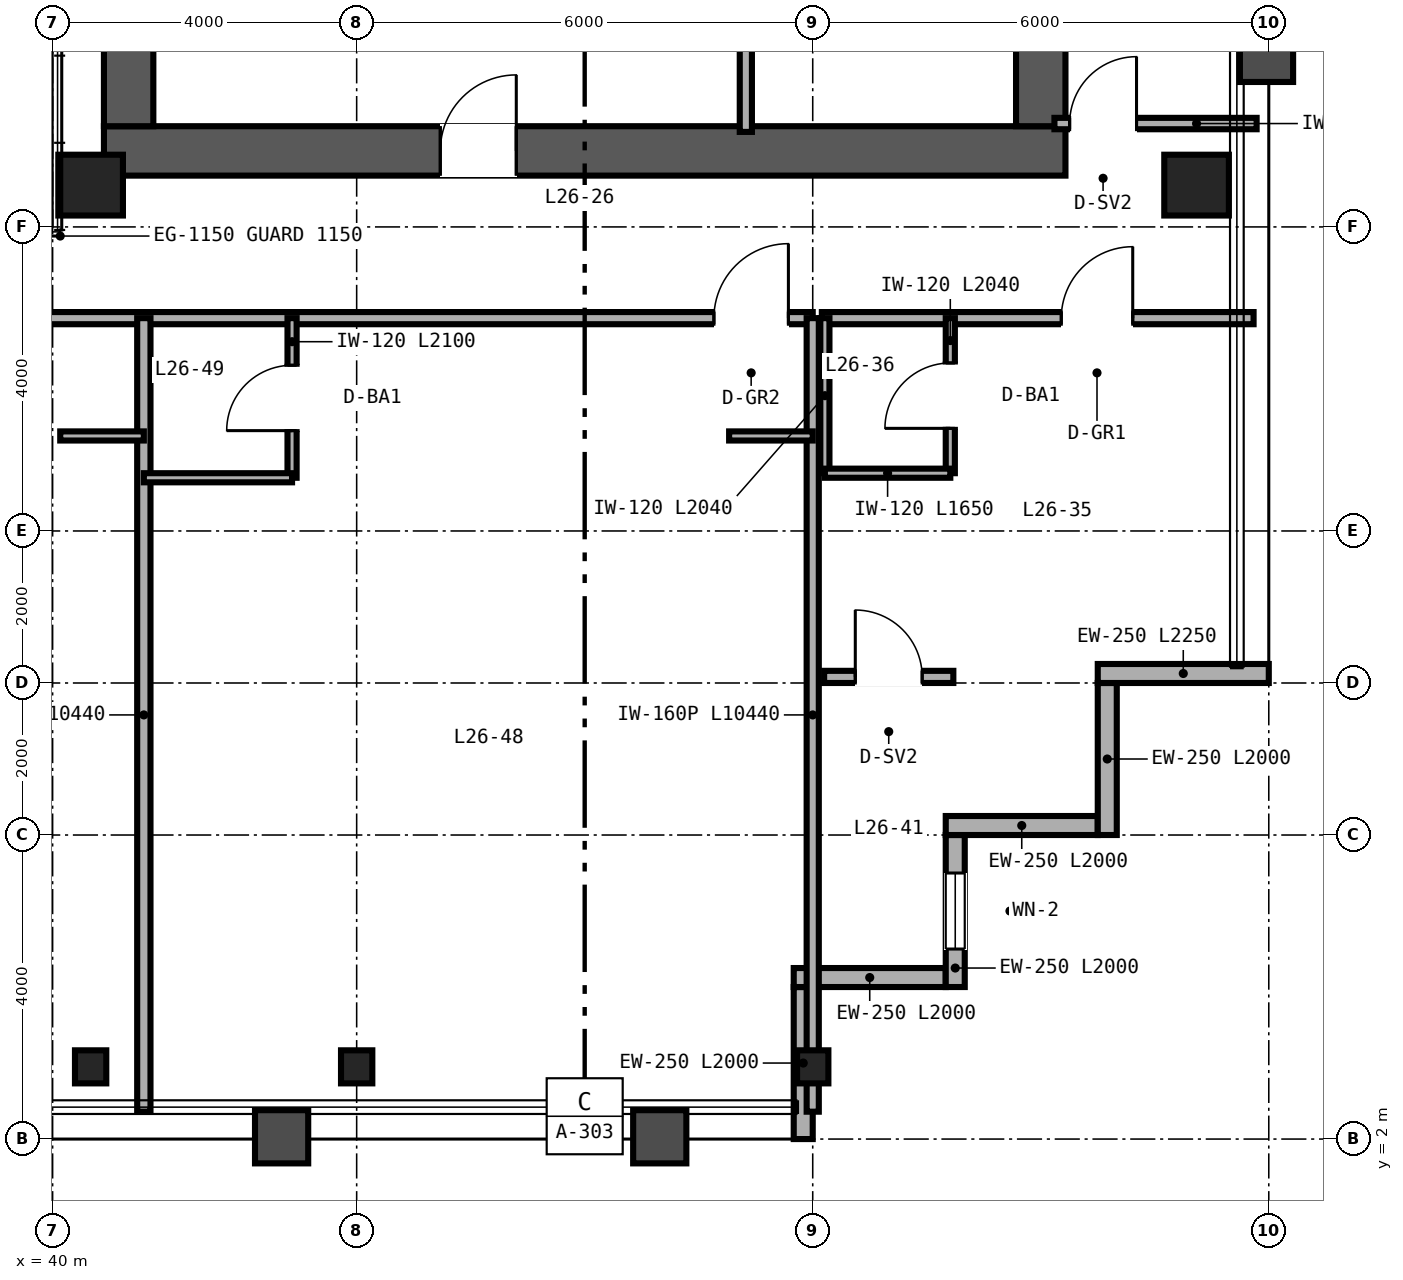
"""IFC4 building model, lengths in metres.
Left out: names, types, materials, properties, quantities, classifications, styles, units other than length and angle.
Written with IfcOpenShell. Run it as: python <this file> out.ifc"""

import sys

from ifc_helpers import new_model, si_unit, direction, frame, frame_2d, origin, origin_2d, place, context, subcontext, project, spatial, rectangle, hollow_rectangle, i_section, extrude, source, transform, mapped, element, fill, save


model = new_model("IFC4")
c1 = context("Model", 3, precision=1e-05, world=origin(), true_north=direction((0.0, 1.0)))
c2 = subcontext(c1, "Body", "Model", "MODEL_VIEW")
j1 = project(units=[si_unit("LENGTHUNIT", "METRE"), si_unit("PLANEANGLEUNIT", "RADIAN")], contexts=[c1])
p1 = place(None, origin())
s1 = spatial("IfcSite", under=j1, at=p1, CompositionType="ELEMENT")
p2 = place(p1, origin())
s2 = spatial("IfcBuilding", under=s1, at=p2, CompositionType="ELEMENT")
p3 = place(p2, frame((0.0, 0.0, 108.0)))
s3 = spatial("IfcBuildingStorey", under=s2, at=p3, CompositionType="ELEMENT", Elevation=108.0)
p4 = place(p3, frame((40.675, 15.0, 0.0), z_axis=(0.0, 0.0, 1.0), x_axis=(1.0, 0.0, 0.0)))
e1 = element("IfcWall", 1, at=p4, inside=s3, PredefinedType="SHEAR", context=c2, shape_type="SweptSolid", body=[
    extrude(rectangle(XDim=12.65, YDim=0.65, at=frame_2d((6.325, 0.0))), origin(), (0.0, 0.0, 1.0), 3.36),
])
p5 = place(p4, frame((4.425, 0.0, 0.0)))
e2 = element("IfcOpeningElement", 2, at=p5, cuts=e1, PredefinedType="OPENING", context=c2, shape_type="SweptSolid", body=[
    extrude(rectangle(XDim=1.0, YDim=2.15, at=frame_2d((0.5, 1.075))), frame((0.0, 0.335, 0.0), z_axis=(0.0, -1.0, 0.0), x_axis=(1.0, 0.0, 0.0)), (0.0, 0.0, 1.0), 0.67),
])
for number, where, z_axis, x_axis in (
    (3, (41.0, 15.325, 0.0), (0.0, 0.0, 1.0), (0.0, 1.0, 0.0)),
    (4, (53.0, 15.325, 0.0), (0.0, 0.0, 1.0), (0.0, 1.0, 0.0)),
):
    element("IfcWall", number, at=place(p3, frame(where, z_axis=z_axis, x_axis=x_axis)), inside=s3, PredefinedType="SHEAR", context=c2, shape_type="SweptSolid", body=[
        extrude(rectangle(XDim=21.35, YDim=0.65, at=frame_2d((10.675, 0.0))), origin(), (0.0, 0.0, 1.0), 3.36),
    ])
m1 = source(origin(), c2, "Body", "SweptSolid", [
    extrude(hollow_rectangle(XDim=0.85, YDim=0.8, WallThickness=0.032, at=origin_2d()), origin(), (0.0, 0.0, 1.0), 3.36),
])
for number, where, z_axis, x_axis in (
    (5, (40.5, 14.55, 0.0), (0.0, 0.0, 1.0), (1.0, 0.0, 0.0)),
    (6, (55.05, 14.55, 0.0), (0.0, 0.0, 1.0), (1.0, 0.0, 0.0)),
):
    element("IfcColumn", number, at=place(p3, frame(where, z_axis=z_axis, x_axis=x_axis)), inside=s3, PredefinedType="COLUMN", context=c2, shape_type="MappedRepresentation", body=[
        mapped(m1, transform((0.0, 0.0, 0.0), scale=1.0)),
    ])
m2 = source(origin(), c2, "Body", "SweptSolid", [
    extrude(i_section(OverallWidth=0.412, OverallDepth=0.435, WebThickness=0.036, FlangeThickness=0.057, FilletRadius=0.025, at=origin_2d()), origin(), (0.0, 0.0, 1.0), 3.36),
])
for number, where, z_axis, x_axis in (
    (7, (40.5, 2.95, 0.0), (0.0, 0.0, 1.0), (1.0, 0.0, 0.0)),
    (8, (44.0, 2.95, 0.0), (0.0, 0.0, 1.0), (1.0, 0.0, 0.0)),
    (9, (50.0, 2.95, 0.0), (0.0, 0.0, 1.0), (1.0, 0.0, 0.0)),
):
    element("IfcColumn", number, at=place(p3, frame(where, z_axis=z_axis, x_axis=x_axis)), inside=s3, PredefinedType="COLUMN", context=c2, shape_type="MappedRepresentation", body=[
        mapped(m2, transform((0.0, 0.0, 0.0), scale=1.0)),
    ])
p6 = place(p3, frame((49.875, 2.0, 0.0), z_axis=(0.0, 0.0, 1.0), x_axis=(0.0, 1.0, 0.0)))
e10 = element("IfcWall", 10, at=p6, inside=s3, PredefinedType="SOLIDWALL", context=c2, shape_type="SweptSolid", body=[
    extrude(rectangle(XDim=2.0, YDim=0.25, at=frame_2d((1.0, 0.0))), origin(), (0.0, 0.0, 1.0), 2.667),
])
p7 = place(p3, frame((49.75, 4.125, 0.0), z_axis=(0.0, 0.0, 1.0), x_axis=(1.0, 0.0, 0.0)))
e11 = element("IfcWall", 11, at=p7, inside=s3, PredefinedType="SOLIDWALL", context=c2, shape_type="SweptSolid", body=[
    extrude(rectangle(XDim=2.0, YDim=0.25, at=frame_2d((1.0, 0.0))), origin(), (0.0, 0.0, 1.0), 3.36),
])
p8 = place(p3, frame((51.875, 4.0, 0.0), z_axis=(0.0, 0.0, 1.0), x_axis=(0.0, 1.0, 0.0)))
e12 = element("IfcWall", 12, at=p8, inside=s3, PredefinedType="SOLIDWALL", context=c2, shape_type="SweptSolid", body=[
    extrude(rectangle(XDim=2.0, YDim=0.25, at=frame_2d((1.0, 0.0))), origin(), (0.0, 0.0, 1.0), 3.36),
])
p9 = place(p8, frame((0.5, 0.0, 0.85)))
e13 = element("IfcOpeningElement", 13, at=p9, cuts=e12, PredefinedType="OPENING", context=c2, shape_type="SweptSolid", body=[
    extrude(rectangle(XDim=1.0, YDim=1.9, at=frame_2d((0.5, 0.95))), frame((0.0, 0.135, 0.0), z_axis=(0.0, -1.0, 0.0), x_axis=(1.0, 0.0, 0.0)), (0.0, 0.0, 1.0), 0.27),
])
for number, where, z_axis, x_axis in (
    (14, (51.75, 6.125, 0.0), (0.0, 0.0, 1.0), (1.0, 0.0, 0.0)),
    (15, (53.875, 6.0, 0.0), (0.0, 0.0, 1.0), (0.0, 1.0, 0.0)),
):
    element("IfcWall", number, at=place(p3, frame(where, z_axis=z_axis, x_axis=x_axis)), inside=s3, PredefinedType="SOLIDWALL", context=c2, shape_type="SweptSolid", body=[
        extrude(rectangle(XDim=2.0, YDim=0.25, at=frame_2d((1.0, 0.0))), origin(), (0.0, 0.0, 1.0), 3.36),
    ])
p10 = place(p3, frame((53.75, 8.125, 0.0), z_axis=(0.0, 0.0, 1.0), x_axis=(1.0, 0.0, 0.0)))
e16 = element("IfcWall", 16, at=p10, inside=s3, PredefinedType="SOLIDWALL", context=c2, shape_type="SweptSolid", body=[
    extrude(rectangle(XDim=2.25, YDim=0.25, at=frame_2d((1.125, 0.0))), origin(), (0.0, 0.0, 1.0), 3.36),
])
p11 = place(p3, frame((49.12, 15.25, 0.0), z_axis=(0.0, 0.0, 1.0), x_axis=(0.0, 1.0, 0.0)))
e17 = element("IfcWall", 17, at=p11, inside=s3, PredefinedType="PARTITIONING", context=c2, shape_type="SweptSolid", body=[
    extrude(rectangle(XDim=16.13, YDim=0.16, at=frame_2d((8.065, 0.0))), origin(), (0.0, 0.0, 1.0), 2.36),
])
p12 = place(p11, frame((4.0, 0.0, 0.0)))
e18 = element("IfcOpeningElement", 18, at=p12, cuts=e17, PredefinedType="OPENING", context=c2, shape_type="SweptSolid", body=[
    extrude(rectangle(XDim=0.92, YDim=2.15, at=frame_2d((0.46, 1.075))), frame((0.0, 0.09, 0.0), z_axis=(0.0, -1.0, 0.0), x_axis=(1.0, 0.0, 0.0)), (0.0, 0.0, 1.0), 0.18),
])
p13 = place(p11, frame((12.0, 0.0, 0.0)))
e19 = element("IfcOpeningElement", 19, at=p13, cuts=e17, PredefinedType="OPENING", context=c2, shape_type="SweptSolid", body=[
    extrude(rectangle(XDim=0.92, YDim=2.15, at=frame_2d((0.46, 1.075))), frame((0.0, 0.09, 0.0), z_axis=(0.0, -1.0, 0.0), x_axis=(1.0, 0.0, 0.0)), (0.0, 0.0, 1.0), 0.18),
])
p14 = place(p3, frame((53.18, 15.36, 0.0), z_axis=(0.0, 0.0, 1.0), x_axis=(1.0, 0.0, 0.0)))
e20 = element("IfcWall", 20, at=p14, inside=s3, PredefinedType="PARTITIONING", context=c2, shape_type="SweptSolid", body=[
    extrude(rectangle(XDim=2.66, YDim=0.15, at=frame_2d((1.33, 0.0))), origin(), (0.0, 0.0, 1.0), 2.581),
])
p15 = place(p14, frame((0.2, 0.0, 0.0)))
e21 = element("IfcOpeningElement", 21, at=p15, cuts=e20, PredefinedType="OPENING", context=c2, shape_type="SweptSolid", body=[
    extrude(rectangle(XDim=0.88, YDim=2.15, at=frame_2d((0.44, 1.075))), frame((0.0, 0.085, 0.0), z_axis=(0.0, -1.0, 0.0), x_axis=(1.0, 0.0, 0.0)), (0.0, 0.0, 1.0), 0.17),
])
p16 = place(p3, frame((50.12, 12.8, 0.0), z_axis=(0.0, 0.0, 1.0), x_axis=(1.0, 0.0, 0.0)))
e22 = element("IfcWall", 22, at=p16, inside=s3, PredefinedType="PARTITIONING", context=c2, shape_type="SweptSolid", body=[
    extrude(rectangle(XDim=5.68, YDim=0.16, at=frame_2d((2.84, 0.0))), origin(), (0.0, 0.0, 1.0), 3.36),
])
p17 = place(p16, frame((3.15, 0.0, 0.0)))
e23 = element("IfcOpeningElement", 23, at=p17, cuts=e22, PredefinedType="OPENING", context=c2, shape_type="SweptSolid", body=[
    extrude(rectangle(XDim=0.94, YDim=2.15, at=frame_2d((0.47, 1.075))), frame((0.0, 0.09, 0.0), z_axis=(0.0, -1.0, 0.0), x_axis=(1.0, 0.0, 0.0)), (0.0, 0.0, 1.0), 0.18),
])
p18 = place(p3, frame((51.81, 10.76, 0.0), z_axis=(0.0, 0.0, 1.0), x_axis=(0.0, 1.0, 0.0)))
e24 = element("IfcWall", 24, at=p18, inside=s3, PredefinedType="PARTITIONING", context=c2, shape_type="SweptSolid", body=[
    extrude(rectangle(XDim=2.04, YDim=0.12, at=frame_2d((1.02, 0.0))), origin(), (0.0, 0.0, 1.0), 3.36),
])
p19 = place(p18, frame((0.59, 0.0, 0.0)))
e25 = element("IfcOpeningElement", 25, at=p19, cuts=e24, PredefinedType="OPENING", context=c2, shape_type="SweptSolid", body=[
    extrude(rectangle(XDim=0.86, YDim=2.1, at=frame_2d((0.43, 1.05))), frame((0.0, 0.07, 0.0), z_axis=(0.0, -1.0, 0.0), x_axis=(1.0, 0.0, 0.0)), (0.0, 0.0, 1.0), 0.14),
])
p20 = place(p3, frame((50.16, 10.76, 0.0), z_axis=(0.0, 0.0, 1.0), x_axis=(0.0, 1.0, 0.0)))
e26 = element("IfcWall", 26, at=p20, inside=s3, PredefinedType="PARTITIONING", context=c2, shape_type="SweptSolid", body=[
    extrude(rectangle(XDim=2.04, YDim=0.12, at=frame_2d((1.02, 0.0))), origin(), (0.0, 0.0, 1.0), 3.36),
])
p21 = place(p3, frame((50.16, 10.76, 0.0), z_axis=(0.0, 0.0, 1.0), x_axis=(1.0, 0.0, 0.0)))
e27 = element("IfcWall", 27, at=p21, inside=s3, PredefinedType="PARTITIONING", context=c2, shape_type="SweptSolid", body=[
    extrude(rectangle(XDim=1.65, YDim=0.12, at=frame_2d((0.825, 0.0))), origin(), (0.0, 0.0, 1.0), 3.36),
])
p22 = place(p3, frame((50.15, 8.08, 0.0), z_axis=(0.0, 0.0, 1.0), x_axis=(1.0, 0.0, 0.0)))
e28 = element("IfcWall", 28, at=p22, inside=s3, PredefinedType="PARTITIONING", context=c2, shape_type="SweptSolid", body=[
    extrude(rectangle(XDim=1.7, YDim=0.16, at=frame_2d((0.85, 0.0))), origin(), (0.0, 0.0, 1.0), 3.36),
])
p23 = place(p22, frame((0.41, 0.0, 0.0)))
e29 = element("IfcOpeningElement", 29, at=p23, cuts=e28, PredefinedType="OPENING", context=c2, shape_type="SweptSolid", body=[
    extrude(rectangle(XDim=0.88, YDim=2.15, at=frame_2d((0.44, 1.075))), frame((0.0, 0.09, 0.0), z_axis=(0.0, -1.0, 0.0), x_axis=(1.0, 0.0, 0.0)), (0.0, 0.0, 1.0), 0.18),
])
p24 = place(p3, frame((14.0, 12.8, 0.0), z_axis=(0.0, 0.0, 1.0), x_axis=(1.0, 0.0, 0.0)))
e30 = element("IfcWall", 30, at=p24, inside=s3, PredefinedType="PARTITIONING", context=c2, shape_type="SweptSolid", body=[
    extrude(rectangle(XDim=36.0, YDim=0.16, at=frame_2d((18.0, 0.0))), origin(), (0.0, 0.0, 1.0), 2.581),
])
p25 = place(p24, frame((7.75, 0.0, 0.0)))
e31 = element("IfcOpeningElement", 31, at=p25, cuts=e30, PredefinedType="OPENING", context=c2, shape_type="SweptSolid", body=[
    extrude(rectangle(XDim=0.98, YDim=2.2, at=frame_2d((0.49, 1.1))), frame((0.0, 0.09, 0.0), z_axis=(0.0, -1.0, 0.0), x_axis=(1.0, 0.0, 0.0)), (0.0, 0.0, 1.0), 0.18),
])
p26 = place(p24, frame((16.9, 0.0, 0.0)))
e32 = element("IfcOpeningElement", 32, at=p26, cuts=e30, PredefinedType="OPENING", context=c2, shape_type="SweptSolid", body=[
    extrude(rectangle(XDim=0.98, YDim=2.2, at=frame_2d((0.49, 1.1))), frame((0.0, 0.09, 0.0), z_axis=(0.0, -1.0, 0.0), x_axis=(1.0, 0.0, 0.0)), (0.0, 0.0, 1.0), 0.18),
])
p27 = place(p24, frame((24.65, 0.0, 0.0)))
e33 = element("IfcOpeningElement", 33, at=p27, cuts=e30, PredefinedType="OPENING", context=c2, shape_type="SweptSolid", body=[
    extrude(rectangle(XDim=0.98, YDim=2.2, at=frame_2d((0.49, 1.1))), frame((0.0, 0.09, 0.0), z_axis=(0.0, -1.0, 0.0), x_axis=(1.0, 0.0, 0.0)), (0.0, 0.0, 1.0), 0.18),
])
p28 = place(p24, frame((34.7, 0.0, 0.0)))
e34 = element("IfcOpeningElement", 34, at=p28, cuts=e30, PredefinedType="OPENING", context=c2, shape_type="SweptSolid", body=[
    extrude(rectangle(XDim=0.98, YDim=2.2, at=frame_2d((0.49, 1.1))), frame((0.0, 0.09, 0.0), z_axis=(0.0, -1.0, 0.0), x_axis=(1.0, 0.0, 0.0)), (0.0, 0.0, 1.0), 0.18),
])
p29 = place(p3, frame((50.0, 2.36, 0.0), z_axis=(0.0, 0.0, 1.0), x_axis=(0.0, 1.0, 0.0)))
e35 = element("IfcWall", 35, at=p29, inside=s3, PredefinedType="PARTITIONING", context=c2, shape_type="SweptSolid", body=[
    extrude(rectangle(XDim=10.44, YDim=0.16, at=frame_2d((5.22, 0.0))), origin(), (0.0, 0.0, 1.0), 2.667),
])
p30 = place(p3, frame((41.2, 2.36, 0.0), z_axis=(0.0, 0.0, 1.0), x_axis=(0.0, 1.0, 0.0)))
e36 = element("IfcWall", 36, at=p30, inside=s3, PredefinedType="PARTITIONING", context=c2, shape_type="SweptSolid", body=[
    extrude(rectangle(XDim=10.44, YDim=0.175, at=frame_2d((5.22, 0.0))), origin(), (0.0, 0.0, 1.0), 2.823),
])
p31 = place(p3, frame((40.1, 11.25, 0.0), z_axis=(0.0, 0.0, 1.0), x_axis=(1.0, 0.0, 0.0)))
e37 = element("IfcWall", 37, at=p31, inside=s3, PredefinedType="PARTITIONING", context=c2, shape_type="SweptSolid", body=[
    extrude(rectangle(XDim=1.1, YDim=0.12, at=frame_2d((0.55, 0.0))), origin(), (0.0, 0.0, 1.0), 2.581),
])
p32 = place(p3, frame((43.15, 10.7, 0.0), z_axis=(0.0, 0.0, 1.0), x_axis=(0.0, 1.0, 0.0)))
e38 = element("IfcWall", 38, at=p32, inside=s3, PredefinedType="PARTITIONING", context=c2, shape_type="SweptSolid", body=[
    extrude(rectangle(XDim=2.1, YDim=0.12, at=frame_2d((1.05, 0.0))), origin(), (0.0, 0.0, 1.0), 3.36),
])
p33 = place(p32, frame((0.62, 0.0, 0.0)))
e39 = element("IfcOpeningElement", 39, at=p33, cuts=e38, PredefinedType="OPENING", context=c2, shape_type="SweptSolid", body=[
    extrude(rectangle(XDim=0.86, YDim=2.1, at=frame_2d((0.43, 1.05))), frame((0.0, 0.07, 0.0), z_axis=(0.0, -1.0, 0.0), x_axis=(1.0, 0.0, 0.0)), (0.0, 0.0, 1.0), 0.14),
])
p34 = place(p3, frame((41.2, 10.7, 0.0), z_axis=(0.0, 0.0, 1.0), x_axis=(1.0, 0.0, 0.0)))
e40 = element("IfcWall", 40, at=p34, inside=s3, PredefinedType="PARTITIONING", context=c2, shape_type="SweptSolid", body=[
    extrude(rectangle(XDim=1.95, YDim=0.12, at=frame_2d((0.975, 0.0))), origin(), (0.0, 0.0, 1.0), 3.36),
])
p35 = place(p3, frame((48.9, 11.25, 0.0), z_axis=(0.0, 0.0, 1.0), x_axis=(1.0, 0.0, 0.0)))
e41 = element("IfcWall", 41, at=p35, inside=s3, PredefinedType="PARTITIONING", context=c2, shape_type="SweptSolid", body=[
    extrude(rectangle(XDim=1.1, YDim=0.12, at=frame_2d((0.55, 0.0))), origin(), (0.0, 0.0, 1.0), 3.36),
])
m3 = source(origin(), c2, "Body", "SweptSolid", [
    extrude(rectangle(XDim=1.0, YDim=1.9, at=frame_2d((0.5, 0.95))), frame((0.0, 0.03, 0.0), z_axis=(0.0, -1.0, 0.0), x_axis=(1.0, 0.0, 0.0)), (0.0, 0.0, 1.0), 0.06),
])
p36 = place(p9, origin())
e42 = element("IfcWindow", 42, at=p36, inside=s3, PartitioningType="SINGLE_PANEL", PredefinedType="WINDOW", context=c2, shape_type="MappedRepresentation", body=[
    mapped(m3, transform((0.0, 0.0, 0.0), scale=1.0)),
])
fill(e13, e42)
m4 = source(origin(), c2, "Body", "SweptSolid", [
    extrude(rectangle(XDim=1.0, YDim=2.15, at=frame_2d((0.5, 1.075))), frame((0.0, 0.025, 0.0), z_axis=(0.0, -1.0, 0.0), x_axis=(1.0, 0.0, 0.0)), (0.0, 0.0, 1.0), 0.05),
])
p37 = place(p5, origin())
e43 = element("IfcDoor", 43, at=p37, inside=s3, OperationType="SINGLE_SWING_RIGHT", PredefinedType="DOOR", context=c2, shape_type="MappedRepresentation", body=[
    mapped(m4, transform((0.0, 0.0, 0.0), scale=1.0)),
])
fill(e2, e43)
m5 = source(origin(), c2, "Body", "SweptSolid", [
    extrude(rectangle(XDim=0.88, YDim=2.15, at=frame_2d((0.44, 1.075))), frame((0.0, 0.025, 0.0), z_axis=(0.0, -1.0, 0.0), x_axis=(1.0, 0.0, 0.0)), (0.0, 0.0, 1.0), 0.05),
])
p38 = place(p15, origin())
e44 = element("IfcDoor", 44, at=p38, inside=s3, OperationType="SINGLE_SWING_RIGHT", PredefinedType="DOOR", context=c2, shape_type="MappedRepresentation", body=[
    mapped(m5, transform((0.0, 0.0, 0.0), scale=1.0)),
])
fill(e21, e44)
m6 = source(origin(), c2, "Body", "SweptSolid", [
    extrude(rectangle(XDim=0.86, YDim=2.1, at=frame_2d((0.43, 1.05))), frame((0.0, 0.025, 0.0), z_axis=(0.0, -1.0, 0.0), x_axis=(1.0, 0.0, 0.0)), (0.0, 0.0, 1.0), 0.05),
])
p39 = place(p19, origin())
e45 = element("IfcDoor", 45, at=p39, inside=s3, OperationType="SINGLE_SWING_LEFT", PredefinedType="DOOR", context=c2, shape_type="MappedRepresentation", body=[
    mapped(m6, transform((0.0, 0.0, 0.0), scale=1.0)),
])
fill(e25, e45)
m7 = source(origin(), c2, "Body", "SweptSolid", [
    extrude(rectangle(XDim=0.94, YDim=2.15, at=frame_2d((0.47, 1.075))), frame((0.0, 0.025, 0.0), z_axis=(0.0, -1.0, 0.0), x_axis=(1.0, 0.0, 0.0)), (0.0, 0.0, 1.0), 0.05),
])
p40 = place(p17, origin())
e46 = element("IfcDoor", 46, at=p40, inside=s3, OperationType="SINGLE_SWING_RIGHT", PredefinedType="DOOR", context=c2, shape_type="MappedRepresentation", body=[
    mapped(m7, transform((0.0, 0.0, 0.0), scale=1.0)),
])
fill(e23, e46)
p41 = place(p23, origin())
e47 = element("IfcDoor", 47, at=p41, inside=s3, OperationType="SINGLE_SWING_LEFT", PredefinedType="DOOR", context=c2, shape_type="MappedRepresentation", body=[
    mapped(m5, transform((0.0, 0.0, 0.0), scale=1.0)),
])
fill(e29, e47)
p42 = place(p33, origin())
e48 = element("IfcDoor", 48, at=p42, inside=s3, OperationType="SINGLE_SWING_LEFT", PredefinedType="DOOR", context=c2, shape_type="MappedRepresentation", body=[
    mapped(m6, transform((0.0, 0.0, 0.0), scale=1.0)),
])
fill(e39, e48)
m8 = source(origin(), c2, "Body", "SweptSolid", [
    extrude(rectangle(XDim=0.98, YDim=2.2, at=frame_2d((0.49, 1.1))), frame((0.0, 0.025, 0.0), z_axis=(0.0, -1.0, 0.0), x_axis=(1.0, 0.0, 0.0)), (0.0, 0.0, 1.0), 0.05),
])
p43 = place(p28, origin())
e49 = element("IfcDoor", 49, at=p43, inside=s3, OperationType="SINGLE_SWING_RIGHT", PredefinedType="DOOR", context=c2, shape_type="MappedRepresentation", body=[
    mapped(m8, transform((0.0, 0.0, 0.0), scale=1.0)),
])
fill(e34, e49)
save(model, sys.argv[1])
